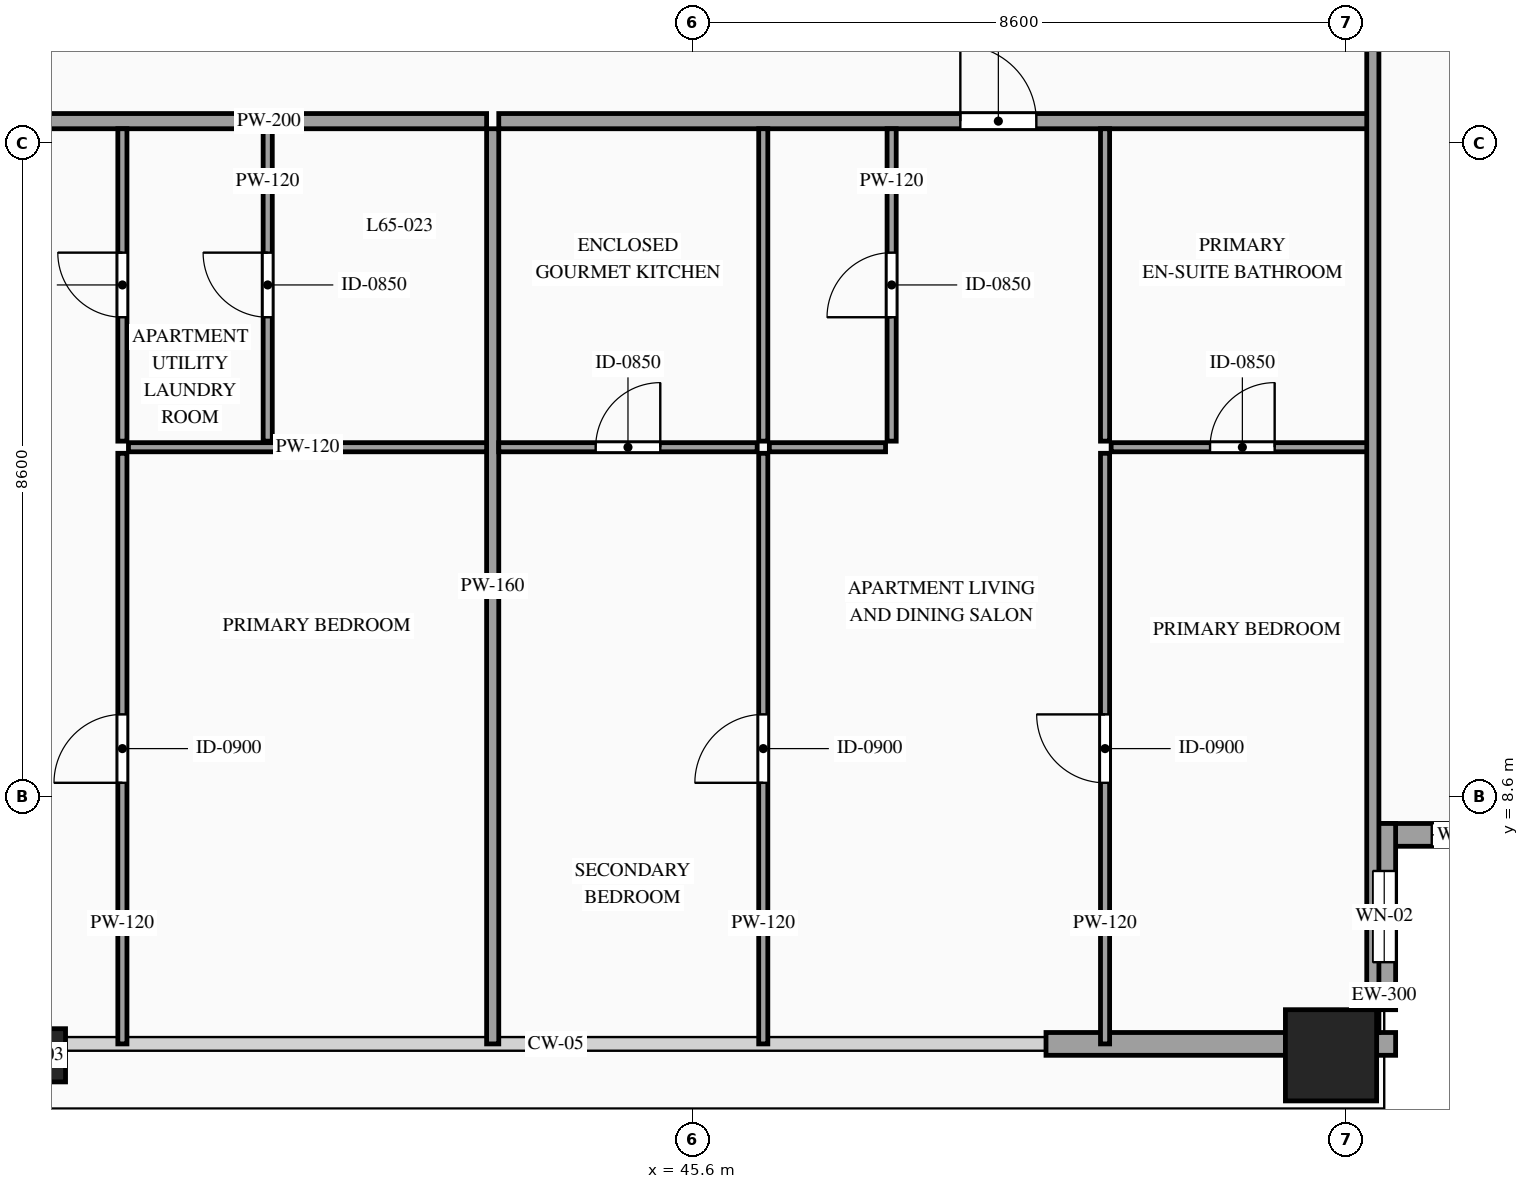
"""IFC4 building model, lengths in metres.
Left out: names, types, materials, properties, quantities, classifications, styles, units other than length and angle.
Written with IfcOpenShell. Run it as: python <this file> out.ifc"""

import sys

from ifc_helpers import new_model, si_unit, direction, frame, frame_2d, origin, origin_2d, place, context, subcontext, project, spatial, rectangle, hollow_rectangle, extrude, source, transform, mapped, element, fill, save


model = new_model("IFC4")
c1 = context("Model", 3, precision=1e-05, world=origin(), true_north=direction((0.0, 1.0)))
c2 = subcontext(c1, "Body", "Model", "MODEL_VIEW")
j1 = project(units=[si_unit("LENGTHUNIT", "METRE"), si_unit("PLANEANGLEUNIT", "RADIAN")], contexts=[c1])
p1 = place(None, origin())
s1 = spatial("IfcSite", under=j1, at=p1, CompositionType="ELEMENT")
p2 = place(p1, origin())
s2 = spatial("IfcBuilding", under=s1, at=p2, CompositionType="ELEMENT")
p3 = place(p2, frame((0.0, 0.0, 245.1)))
s3 = spatial("IfcBuildingStorey", under=s2, at=p3, CompositionType="ELEMENT", Elevation=245.1)
m1 = source(origin(), c2, "Body", "SweptSolid", [
    extrude(hollow_rectangle(XDim=0.7, YDim=0.7, WallThickness=0.032, at=origin_2d()), origin(), (0.0, 0.0, 1.0), 3.5),
])
p4 = place(p3, frame((37.0, 5.2, 0.0), z_axis=(0.0, 0.0, 1.0), x_axis=(1.0, 0.0, 0.0)))
e1 = element("IfcColumn", 1, at=p4, inside=s3, PredefinedType="COLUMN", context=c2, shape_type="MappedRepresentation", body=[
    mapped(m1, transform((0.0, 0.0, 0.0), scale=1.0)),
])
m2 = source(origin(), c2, "Body", "SweptSolid", [
    extrude(hollow_rectangle(XDim=1.2, YDim=1.2, WallThickness=0.055, at=origin_2d()), origin(), (0.0, 0.0, 1.0), 3.5),
])
p5 = place(p3, frame((54.0, 5.2, 0.0), z_axis=(0.0, 0.0, 1.0), x_axis=(1.0, 0.0, 0.0)))
e2 = element("IfcColumn", 2, at=p5, inside=s3, PredefinedType="COLUMN", context=c2, shape_type="MappedRepresentation", body=[
    mapped(m2, transform((0.0, 0.0, 0.0), scale=1.0)),
])
p6 = place(p3, frame((54.55, 8.1, 0.0), z_axis=(0.0, 0.0, 1.0), x_axis=(1.0, 0.0, 0.0)))
e3 = element("IfcWall", 3, at=p6, inside=s3, PredefinedType="SOLIDWALL", context=c2, shape_type="SweptSolid", body=[
    extrude(rectangle(XDim=2.45, YDim=0.3, at=frame_2d((1.225, 0.0))), origin(), (0.0, 0.0, 1.0), 3.28),
])
p7 = place(p6, frame((0.775, 0.0, 0.85)))
e4 = element("IfcOpeningElement", 4, at=p7, cuts=e3, PredefinedType="OPENING", context=c2, shape_type="SweptSolid", body=[
    extrude(rectangle(XDim=0.9, YDim=1.5, at=frame_2d((0.45, 0.75))), frame((0.0, 0.165, 0.0), z_axis=(0.0, -1.0, 0.0), x_axis=(1.0, 0.0, 0.0)), (0.0, 0.0, 1.0), 0.33),
])
p8 = place(p3, frame((54.7, 5.8, 0.0), z_axis=(0.0, 0.0, 1.0), x_axis=(0.0, 1.0, 0.0)))
e5 = element("IfcWall", 5, at=p8, inside=s3, PredefinedType="SOLIDWALL", context=c2, shape_type="SweptSolid", body=[
    extrude(rectangle(XDim=2.45, YDim=0.3, at=frame_2d((1.225, 0.0))), origin(), (0.0, 0.0, 1.0), 3.28),
])
p9 = place(p8, frame((0.625, 0.0, 0.85)))
e6 = element("IfcOpeningElement", 6, at=p9, cuts=e5, PredefinedType="OPENING", context=c2, shape_type="SweptSolid", body=[
    extrude(rectangle(XDim=1.2, YDim=2.1, at=frame_2d((0.6, 1.05))), frame((0.0, 0.165, 0.0), z_axis=(0.0, -1.0, 0.0), x_axis=(1.0, 0.0, 0.0)), (0.0, 0.0, 1.0), 0.33),
])
m3 = source(origin(), c2, "Body", "SweptSolid", [
    extrude(rectangle(XDim=0.25, YDim=0.3, at=frame_2d((0.125, 0.0))), origin(), (0.0, 0.0, 1.0), 3.28),
])
p10 = place(p3, frame((54.6, 5.35, 0.0), z_axis=(0.0, 0.0, 1.0), x_axis=(1.0, 0.0, 0.0)))
e7 = element("IfcWall", 7, at=p10, inside=s3, PredefinedType="SOLIDWALL", context=c2, shape_type="MappedRepresentation", body=[
    mapped(m3, transform((0.0, 0.0, 0.0), scale=1.0)),
])
m4 = source(origin(), c2, "Body", "SweptSolid", [
    extrude(rectangle(XDim=3.15, YDim=0.3, at=frame_2d((1.575, 0.0))), origin(), (0.0, 0.0, 1.0), 2.835),
])
p11 = place(p3, frame((50.25, 5.35, 0.0), z_axis=(0.0, 0.0, 1.0), x_axis=(1.0, 0.0, 0.0)))
e8 = element("IfcWall", 8, at=p11, inside=s3, PredefinedType="SOLIDWALL", context=c2, shape_type="MappedRepresentation", body=[
    mapped(m4, transform((0.0, 0.0, 0.0), scale=1.0)),
])
p12 = place(p3, frame((31.11, 17.49, 0.0), z_axis=(0.0, 0.0, 1.0), x_axis=(1.0, 0.0, 0.0)))
e9 = element("IfcWall", 9, at=p12, inside=s3, PredefinedType="PARTITIONING", context=c2, shape_type="SweptSolid", body=[
    extrude(rectangle(XDim=11.78, YDim=0.2, at=frame_2d((5.89, 0.0))), origin(), (0.0, 0.0, 1.0), 3.28),
])
p13 = place(p12, frame((4.801, 0.0, 0.0)))
e10 = element("IfcOpeningElement", 10, at=p13, cuts=e9, PredefinedType="OPENING", context=c2, shape_type="SweptSolid", body=[
    extrude(rectangle(XDim=1.0, YDim=2.2, at=frame_2d((0.5, 1.1))), frame((0.0, 0.115, 0.0), z_axis=(0.0, -1.0, 0.0), x_axis=(1.0, 0.0, 0.0)), (0.0, 0.0, 1.0), 0.23),
])
m5 = source(origin(), c2, "Body", "SweptSolid", [
    extrude(rectangle(XDim=12.04, YDim=0.16, at=frame_2d((6.02, 0.0))), origin(), (0.0, 0.0, 1.0), 3.28),
])
p14 = place(p3, frame((42.97, 5.35, 0.0), z_axis=(0.0, 0.0, 1.0), x_axis=(0.0, 1.0, 0.0)))
e11 = element("IfcWall", 11, at=p14, inside=s3, PredefinedType="PARTITIONING", context=c2, shape_type="MappedRepresentation", body=[
    mapped(m5, transform((0.0, 0.0, 0.0), scale=1.0)),
])
p15 = place(p3, frame((40.01, 13.28, 0.0), z_axis=(0.0, 0.0, 1.0), x_axis=(0.0, 1.0, 0.0)))
e12 = element("IfcWall", 12, at=p15, inside=s3, PredefinedType="PARTITIONING", context=c2, shape_type="SweptSolid", body=[
    extrude(rectangle(XDim=4.11, YDim=0.12, at=frame_2d((2.055, 0.0))), origin(), (0.0, 0.0, 1.0), 3.28),
])
p16 = place(p15, frame((1.63, 0.0, 0.0)))
e13 = element("IfcOpeningElement", 13, at=p16, cuts=e12, PredefinedType="OPENING", context=c2, shape_type="SweptSolid", body=[
    extrude(rectangle(XDim=0.85, YDim=2.1, at=frame_2d((0.425, 1.05))), frame((0.0, 0.075, 0.0), z_axis=(0.0, -1.0, 0.0), x_axis=(1.0, 0.0, 0.0)), (0.0, 0.0, 1.0), 0.15),
])
m6 = source(origin(), c2, "Body", "SweptSolid", [
    extrude(rectangle(XDim=4.712, YDim=0.12, at=frame_2d((2.356, 0.0))), origin(), (0.0, 0.0, 1.0), 3.28),
])
p17 = place(p3, frame((38.178, 13.2, 0.0), z_axis=(0.0, 0.0, 1.0), x_axis=(1.0, 0.0, 0.0)))
e14 = element("IfcWall", 14, at=p17, inside=s3, PredefinedType="PARTITIONING", context=c2, shape_type="MappedRepresentation", body=[
    mapped(m6, transform((0.0, 0.0, 0.0), scale=1.0)),
])
p18 = place(p3, frame((38.098, 5.35, 0.0), z_axis=(0.0, 0.0, 1.0), x_axis=(0.0, 1.0, 0.0)))
e15 = element("IfcWall", 15, at=p18, inside=s3, PredefinedType="PARTITIONING", context=c2, shape_type="SweptSolid", body=[
    extrude(rectangle(XDim=7.77, YDim=0.12, at=frame_2d((3.885, 0.0))), origin(), (0.0, 0.0, 1.0), 3.28),
])
p19 = place(p18, frame((3.435, 0.0, 0.0)))
e16 = element("IfcOpeningElement", 16, at=p19, cuts=e15, PredefinedType="OPENING", context=c2, shape_type="SweptSolid", body=[
    extrude(rectangle(XDim=0.9, YDim=2.15, at=frame_2d((0.45, 1.075))), frame((0.0, 0.075, 0.0), z_axis=(0.0, -1.0, 0.0), x_axis=(1.0, 0.0, 0.0)), (0.0, 0.0, 1.0), 0.15),
])
p20 = place(p3, frame((38.098, 13.28, 0.0), z_axis=(0.0, 0.0, 1.0), x_axis=(0.0, 1.0, 0.0)))
e17 = element("IfcWall", 17, at=p20, inside=s3, PredefinedType="PARTITIONING", context=c2, shape_type="SweptSolid", body=[
    extrude(rectangle(XDim=4.11, YDim=0.12, at=frame_2d((2.055, 0.0))), origin(), (0.0, 0.0, 1.0), 3.28),
])
p21 = place(p20, frame((1.63, 0.0, 0.0)))
e18 = element("IfcOpeningElement", 18, at=p21, cuts=e17, PredefinedType="OPENING", context=c2, shape_type="SweptSolid", body=[
    extrude(rectangle(XDim=0.85, YDim=2.1, at=frame_2d((0.425, 1.05))), frame((0.0, 0.075, 0.0), z_axis=(0.0, -1.0, 0.0), x_axis=(1.0, 0.0, 0.0)), (0.0, 0.0, 1.0), 0.15),
])
p22 = place(p3, frame((43.05, 17.49, 0.0), z_axis=(0.0, 0.0, 1.0), x_axis=(1.0, 0.0, 0.0)))
e19 = element("IfcWall", 19, at=p22, inside=s3, PredefinedType="PARTITIONING", context=c2, shape_type="SweptSolid", body=[
    extrude(rectangle(XDim=11.51, YDim=0.2, at=frame_2d((5.755, 0.0))), origin(), (0.0, 0.0, 1.0), 3.28),
])
p23 = place(p22, frame((6.073, 0.0, 0.0)))
e20 = element("IfcOpeningElement", 20, at=p23, cuts=e19, PredefinedType="OPENING", context=c2, shape_type="SweptSolid", body=[
    extrude(rectangle(XDim=1.0, YDim=2.2, at=frame_2d((0.5, 1.1))), frame((0.0, 0.115, 0.0), z_axis=(0.0, -1.0, 0.0), x_axis=(1.0, 0.0, 0.0)), (0.0, 0.0, 1.0), 0.23),
])
p24 = place(p3, frame((43.05, 13.2, 0.0), z_axis=(0.0, 0.0, 1.0), x_axis=(1.0, 0.0, 0.0)))
e21 = element("IfcWall", 21, at=p24, inside=s3, PredefinedType="PARTITIONING", context=c2, shape_type="SweptSolid", body=[
    extrude(rectangle(XDim=3.4, YDim=0.12, at=frame_2d((1.7, 0.0))), origin(), (0.0, 0.0, 1.0), 3.28),
])
p25 = place(p24, frame((1.275, 0.0, 0.0)))
e22 = element("IfcOpeningElement", 22, at=p25, cuts=e21, PredefinedType="OPENING", context=c2, shape_type="SweptSolid", body=[
    extrude(rectangle(XDim=0.85, YDim=2.1, at=frame_2d((0.425, 1.05))), frame((0.0, 0.075, 0.0), z_axis=(0.0, -1.0, 0.0), x_axis=(1.0, 0.0, 0.0)), (0.0, 0.0, 1.0), 0.15),
])
m7 = source(origin(), c2, "Body", "SweptSolid", [
    extrude(rectangle(XDim=4.11, YDim=0.12, at=frame_2d((2.055, 0.0))), origin(), (0.0, 0.0, 1.0), 3.28),
])
p26 = place(p3, frame((46.53, 13.28, 0.0), z_axis=(0.0, 0.0, 1.0), x_axis=(0.0, 1.0, 0.0)))
e23 = element("IfcWall", 23, at=p26, inside=s3, PredefinedType="PARTITIONING", context=c2, shape_type="MappedRepresentation", body=[
    mapped(m7, transform((0.0, 0.0, 0.0), scale=1.0)),
])
m8 = source(origin(), c2, "Body", "SweptSolid", [
    extrude(rectangle(XDim=1.529, YDim=0.12, at=frame_2d((0.764, 0.0))), origin(), (0.0, 0.0, 1.0), 3.28),
])
p27 = place(p3, frame((46.61, 13.2, 0.0), z_axis=(0.0, 0.0, 1.0), x_axis=(1.0, 0.0, 0.0)))
e24 = element("IfcWall", 24, at=p27, inside=s3, PredefinedType="PARTITIONING", context=c2, shape_type="MappedRepresentation", body=[
    mapped(m8, transform((0.0, 0.0, 0.0), scale=1.0)),
])
p28 = place(p3, frame((48.219, 13.28, 0.0), z_axis=(0.0, 0.0, 1.0), x_axis=(0.0, 1.0, 0.0)))
e25 = element("IfcWall", 25, at=p28, inside=s3, PredefinedType="PARTITIONING", context=c2, shape_type="SweptSolid", body=[
    extrude(rectangle(XDim=4.11, YDim=0.12, at=frame_2d((2.055, 0.0))), origin(), (0.0, 0.0, 1.0), 3.28),
])
p29 = place(p28, frame((1.63, 0.0, 0.0)))
e26 = element("IfcOpeningElement", 26, at=p29, cuts=e25, PredefinedType="OPENING", context=c2, shape_type="SweptSolid", body=[
    extrude(rectangle(XDim=0.85, YDim=2.1, at=frame_2d((0.425, 1.05))), frame((0.0, 0.075, 0.0), z_axis=(0.0, -1.0, 0.0), x_axis=(1.0, 0.0, 0.0)), (0.0, 0.0, 1.0), 0.15),
])
p30 = place(p3, frame((51.107, 13.2, 0.0), z_axis=(0.0, 0.0, 1.0), x_axis=(1.0, 0.0, 0.0)))
e27 = element("IfcWall", 27, at=p30, inside=s3, PredefinedType="PARTITIONING", context=c2, shape_type="SweptSolid", body=[
    extrude(rectangle(XDim=3.453, YDim=0.12, at=frame_2d((1.727, 0.0))), origin(), (0.0, 0.0, 1.0), 3.28),
])
p31 = place(p30, frame((1.302, 0.0, 0.0)))
e28 = element("IfcOpeningElement", 28, at=p31, cuts=e27, PredefinedType="OPENING", context=c2, shape_type="SweptSolid", body=[
    extrude(rectangle(XDim=0.85, YDim=2.1, at=frame_2d((0.425, 1.05))), frame((0.0, 0.075, 0.0), z_axis=(0.0, -1.0, 0.0), x_axis=(1.0, 0.0, 0.0)), (0.0, 0.0, 1.0), 0.15),
])
p32 = place(p3, frame((51.027, 13.28, 0.0), z_axis=(0.0, 0.0, 1.0), x_axis=(0.0, 1.0, 0.0)))
e29 = element("IfcWall", 29, at=p32, inside=s3, PredefinedType="PARTITIONING", context=c2, shape_type="MappedRepresentation", body=[
    mapped(m7, transform((0.0, 0.0, 0.0), scale=1.0)),
])
p33 = place(p3, frame((46.53, 5.35, 0.0), z_axis=(0.0, 0.0, 1.0), x_axis=(0.0, 1.0, 0.0)))
e30 = element("IfcWall", 30, at=p33, inside=s3, PredefinedType="PARTITIONING", context=c2, shape_type="SweptSolid", body=[
    extrude(rectangle(XDim=7.77, YDim=0.12, at=frame_2d((3.885, 0.0))), origin(), (0.0, 0.0, 1.0), 3.28),
])
p34 = place(p33, frame((3.435, 0.0, 0.0)))
e31 = element("IfcOpeningElement", 31, at=p34, cuts=e30, PredefinedType="OPENING", context=c2, shape_type="SweptSolid", body=[
    extrude(rectangle(XDim=0.9, YDim=2.15, at=frame_2d((0.45, 1.075))), frame((0.0, 0.075, 0.0), z_axis=(0.0, -1.0, 0.0), x_axis=(1.0, 0.0, 0.0)), (0.0, 0.0, 1.0), 0.15),
])
p35 = place(p3, frame((51.027, 5.35, 0.0), z_axis=(0.0, 0.0, 1.0), x_axis=(0.0, 1.0, 0.0)))
e32 = element("IfcWall", 32, at=p35, inside=s3, PredefinedType="PARTITIONING", context=c2, shape_type="SweptSolid", body=[
    extrude(rectangle(XDim=7.77, YDim=0.12, at=frame_2d((3.885, 0.0))), origin(), (0.0, 0.0, 1.0), 3.28),
])
p36 = place(p35, frame((3.435, 0.0, 0.0)))
e33 = element("IfcOpeningElement", 33, at=p36, cuts=e32, PredefinedType="OPENING", context=c2, shape_type="SweptSolid", body=[
    extrude(rectangle(XDim=0.9, YDim=2.15, at=frame_2d((0.45, 1.075))), frame((0.0, 0.075, 0.0), z_axis=(0.0, -1.0, 0.0), x_axis=(1.0, 0.0, 0.0)), (0.0, 0.0, 1.0), 0.15),
])
m9 = source(origin(), c2, "Body", "SweptSolid", [
    extrude(rectangle(XDim=26.69, YDim=0.16, at=frame_2d((13.345, 0.0))), origin(), (0.0, 0.0, 1.0), 3.28),
])
p37 = place(p3, frame((54.55, 5.5, 0.0), z_axis=(0.0, 0.0, 1.0), x_axis=(0.0, 1.0, 0.0)))
e34 = element("IfcWall", 34, at=p37, inside=s3, PredefinedType="PARTITIONING", context=c2, shape_type="MappedRepresentation", body=[
    mapped(m9, transform((0.0, 0.0, 0.0), scale=1.0)),
])
m10 = source(origin(), c2, "Body", "SweptSolid", [
    extrude(rectangle(XDim=0.9, YDim=1.5, at=frame_2d((0.45, 0.75))), frame((0.0, 0.03, 0.0), z_axis=(0.0, -1.0, 0.0), x_axis=(1.0, 0.0, 0.0)), (0.0, 0.0, 1.0), 0.06),
])
p38 = place(p7, origin())
e35 = element("IfcWindow", 35, at=p38, inside=s3, PartitioningType="SINGLE_PANEL", PredefinedType="WINDOW", context=c2, shape_type="MappedRepresentation", body=[
    mapped(m10, transform((0.0, 0.0, 0.0), scale=1.0)),
])
fill(e4, e35)
m11 = source(origin(), c2, "Body", "SweptSolid", [
    extrude(rectangle(XDim=1.2, YDim=2.1, at=frame_2d((0.6, 1.05))), frame((0.0, 0.03, 0.0), z_axis=(0.0, -1.0, 0.0), x_axis=(1.0, 0.0, 0.0)), (0.0, 0.0, 1.0), 0.06),
])
p39 = place(p9, origin())
e36 = element("IfcWindow", 36, at=p39, inside=s3, PartitioningType="SINGLE_PANEL", PredefinedType="WINDOW", context=c2, shape_type="MappedRepresentation", body=[
    mapped(m11, transform((0.0, 0.0, 0.0), scale=1.0)),
])
fill(e6, e36)
m12 = source(origin(), c2, "Body", "SweptSolid", [
    extrude(rectangle(XDim=0.85, YDim=2.1, at=frame_2d((0.425, 1.05))), frame((0.0, 0.025, 0.0), z_axis=(0.0, -1.0, 0.0), x_axis=(1.0, 0.0, 0.0)), (0.0, 0.0, 1.0), 0.05),
])
p40 = place(p16, origin())
e37 = element("IfcDoor", 37, at=p40, inside=s3, OperationType="SINGLE_SWING_RIGHT", PredefinedType="DOOR", context=c2, shape_type="MappedRepresentation", body=[
    mapped(m12, transform((0.0, 0.0, 0.0), scale=1.0)),
])
fill(e13, e37)
m13 = source(origin(), c2, "Body", "SweptSolid", [
    extrude(rectangle(XDim=0.9, YDim=2.15, at=frame_2d((0.45, 1.075))), frame((0.0, 0.025, 0.0), z_axis=(0.0, -1.0, 0.0), x_axis=(1.0, 0.0, 0.0)), (0.0, 0.0, 1.0), 0.05),
])
p41 = place(p19, origin())
e38 = element("IfcDoor", 38, at=p41, inside=s3, OperationType="SINGLE_SWING_LEFT", PredefinedType="DOOR", context=c2, shape_type="MappedRepresentation", body=[
    mapped(m13, transform((0.0, 0.0, 0.0), scale=1.0)),
])
fill(e16, e38)
p42 = place(p21, origin())
e39 = element("IfcDoor", 39, at=p42, inside=s3, OperationType="SINGLE_SWING_RIGHT", PredefinedType="DOOR", context=c2, shape_type="MappedRepresentation", body=[
    mapped(m12, transform((0.0, 0.0, 0.0), scale=1.0)),
])
fill(e18, e39)
m14 = source(origin(), c2, "Body", "SweptSolid", [
    extrude(rectangle(XDim=1.0, YDim=2.2, at=frame_2d((0.5, 1.1))), frame((0.0, 0.025, 0.0), z_axis=(0.0, -1.0, 0.0), x_axis=(1.0, 0.0, 0.0)), (0.0, 0.0, 1.0), 0.05),
])
p43 = place(p23, origin())
e40 = element("IfcDoor", 40, at=p43, inside=s3, OperationType="SINGLE_SWING_LEFT", PredefinedType="DOOR", context=c2, shape_type="MappedRepresentation", body=[
    mapped(m14, transform((0.0, 0.0, 0.0), scale=1.0)),
])
fill(e20, e40)
p44 = place(p25, origin())
e41 = element("IfcDoor", 41, at=p44, inside=s3, OperationType="SINGLE_SWING_RIGHT", PredefinedType="DOOR", context=c2, shape_type="MappedRepresentation", body=[
    mapped(m12, transform((0.0, 0.0, 0.0), scale=1.0)),
])
fill(e22, e41)
p45 = place(p29, origin())
e42 = element("IfcDoor", 42, at=p45, inside=s3, OperationType="SINGLE_SWING_LEFT", PredefinedType="DOOR", context=c2, shape_type="MappedRepresentation", body=[
    mapped(m12, transform((0.0, 0.0, 0.0), scale=1.0)),
])
fill(e26, e42)
p46 = place(p31, origin())
e43 = element("IfcDoor", 43, at=p46, inside=s3, OperationType="SINGLE_SWING_RIGHT", PredefinedType="DOOR", context=c2, shape_type="MappedRepresentation", body=[
    mapped(m12, transform((0.0, 0.0, 0.0), scale=1.0)),
])
fill(e28, e43)
p47 = place(p34, origin())
e44 = element("IfcDoor", 44, at=p47, inside=s3, OperationType="SINGLE_SWING_LEFT", PredefinedType="DOOR", context=c2, shape_type="MappedRepresentation", body=[
    mapped(m13, transform((0.0, 0.0, 0.0), scale=1.0)),
])
fill(e31, e44)
p48 = place(p36, origin())
e45 = element("IfcDoor", 45, at=p48, inside=s3, OperationType="SINGLE_SWING_RIGHT", PredefinedType="DOOR", context=c2, shape_type="MappedRepresentation", body=[
    mapped(m13, transform((0.0, 0.0, 0.0), scale=1.0)),
])
fill(e33, e45)
save(model, sys.argv[1])
